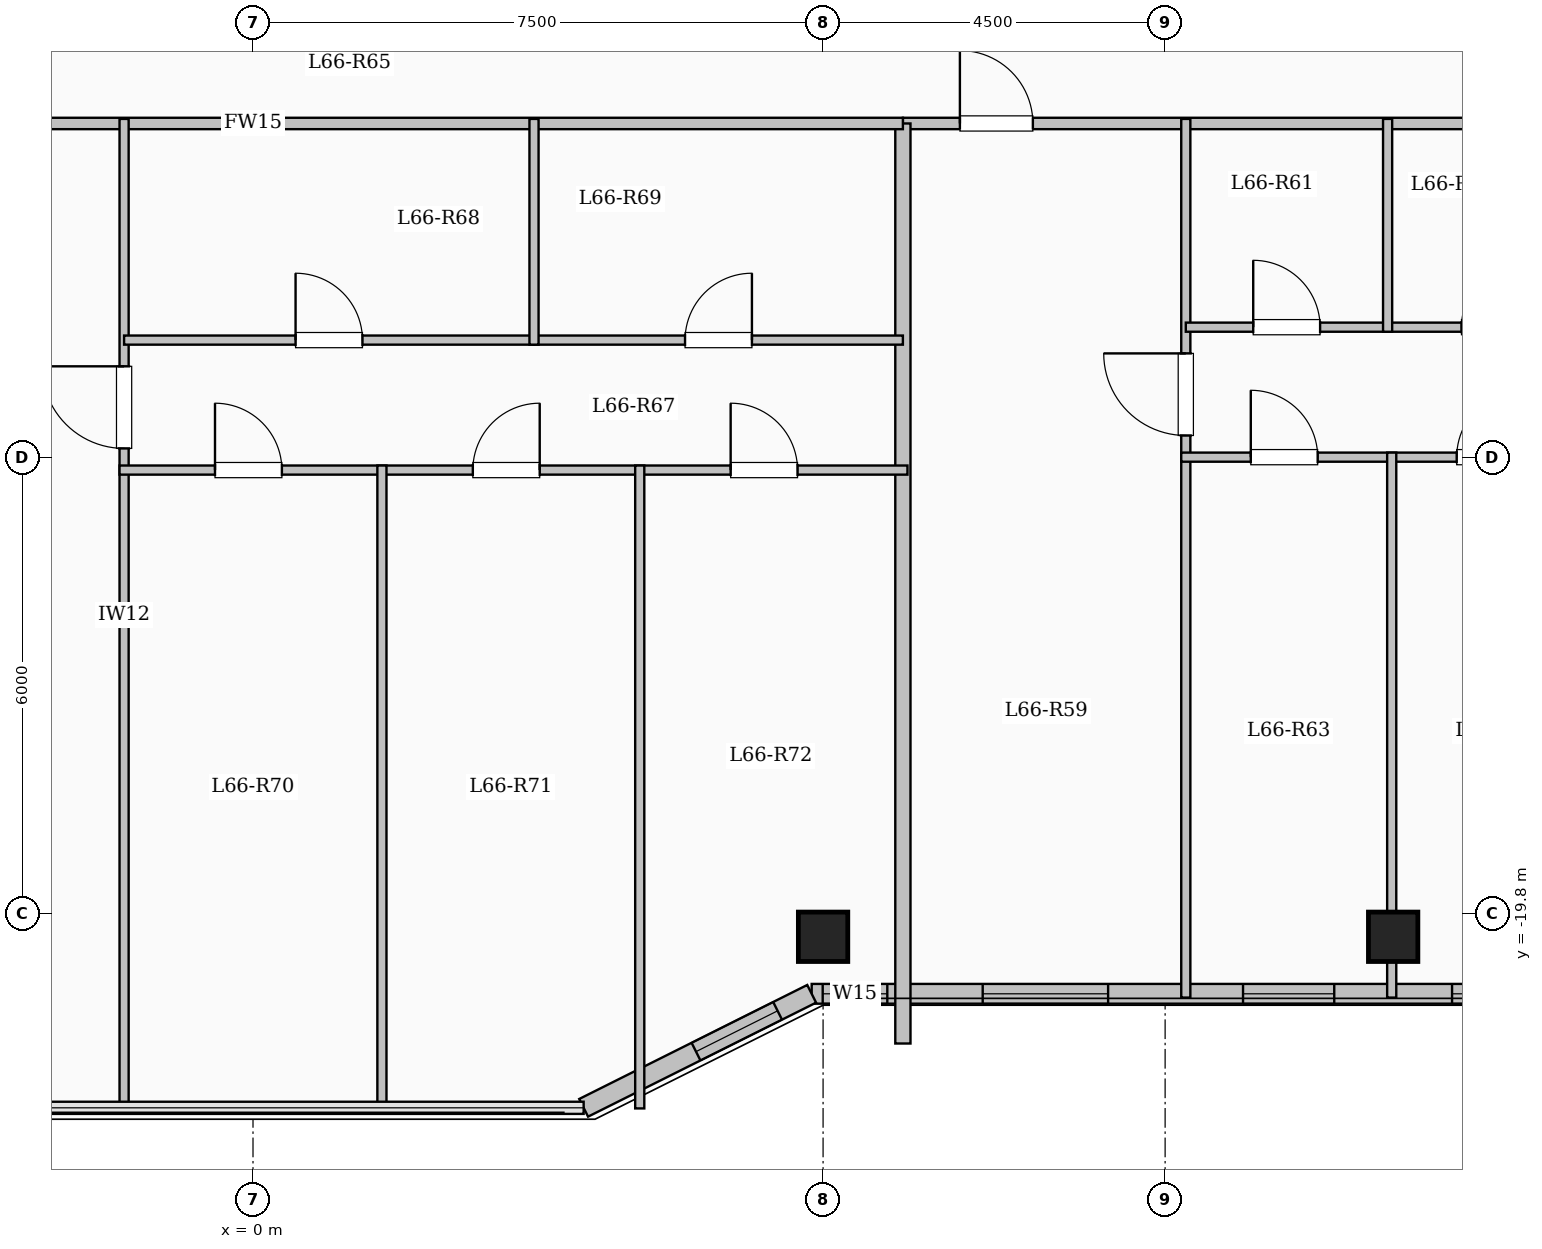
"""IFC4 building model, lengths in metres.
Left out: names, types, materials, properties, quantities, classifications, styles, units other than length and angle.
Written with IfcOpenShell. Run it as: python <this file> out.ifc"""

import sys

from ifc_helpers import new_model, si_unit, direction, frame, frame_2d, origin, origin_2d, place, context, subcontext, project, spatial, rectangle, extrude, element, fill, save


model = new_model("IFC4")
c1 = context("Model", 3, precision=1e-05, world=origin(), true_north=direction((0.0, 1.0)))
c2 = subcontext(c1, "Body", "Model", "MODEL_VIEW")
j1 = project(units=[si_unit("LENGTHUNIT", "METRE"), si_unit("PLANEANGLEUNIT", "RADIAN")], contexts=[c1])
p1 = place(None, origin())
s1 = spatial("IfcSite", under=j1, at=p1, CompositionType="ELEMENT")
p2 = place(p1, origin())
s2 = spatial("IfcBuilding", under=s1, at=p2, CompositionType="ELEMENT")
p3 = place(p2, frame((0.0, 0.0, 244.85)))
s3 = spatial("IfcBuildingStorey", under=s2, at=p3, CompositionType="ELEMENT", Elevation=244.85)
for number, where, z_axis, x_axis in (
    (1, (7.5, -20.1, 0.0), (0.0, 0.0, 1.0), (1.0, 0.0, 0.0)),
    (2, (15.0, -20.1, 0.0), (0.0, 0.0, 1.0), (1.0, 0.0, 0.0)),
):
    element("IfcColumn", number, at=place(p3, frame(where, z_axis=z_axis, x_axis=x_axis)), inside=s3, PredefinedType="COLUMN", context=c2, shape_type="SweptSolid", body=[
        extrude(rectangle(XDim=0.65, YDim=0.65, at=origin_2d()), origin(), (0.0, 0.0, 1.0), 3.35),
    ])
p4 = place(p3, frame((17.85, -20.85, 0.0), z_axis=(0.0, 0.0, 1.0), x_axis=(-1.0, 0.0, 0.0)))
e3 = element("IfcWall", 3, at=p4, inside=s3, PredefinedType="SOLIDWALL", context=c2, shape_type="SweptSolid", body=[
    extrude(rectangle(XDim=10.5, YDim=0.26, at=frame_2d((5.25, 0.0))), origin(), (0.0, 0.0, 1.0), 3.1),
])
p5 = place(p4, frame((0.875, 0.0, 0.95)))
e4 = element("IfcOpeningElement", 4, at=p5, cuts=e3, PredefinedType="OPENING", context=c2, shape_type="SweptSolid", body=[
    extrude(rectangle(XDim=1.2, YDim=1.5, at=frame_2d((0.6, 0.75))), frame((0.0, 0.14, 0.0), z_axis=(0.0, -1.0, 0.0), x_axis=(1.0, 0.0, 0.0)), (0.0, 0.0, 1.0), 0.28),
])
p6 = place(p4, frame((3.625, 0.0, 0.95)))
e5 = element("IfcOpeningElement", 5, at=p6, cuts=e3, PredefinedType="OPENING", context=c2, shape_type="SweptSolid", body=[
    extrude(rectangle(XDim=1.2, YDim=1.5, at=frame_2d((0.6, 0.75))), frame((0.0, 0.14, 0.0), z_axis=(0.0, -1.0, 0.0), x_axis=(1.0, 0.0, 0.0)), (0.0, 0.0, 1.0), 0.28),
])
p7 = place(p4, frame((6.6, 0.0, 0.9)))
e6 = element("IfcOpeningElement", 6, at=p7, cuts=e3, PredefinedType="OPENING", context=c2, shape_type="SweptSolid", body=[
    extrude(rectangle(XDim=1.65, YDim=1.6, at=frame_2d((0.825, 0.8))), frame((0.0, 0.14, 0.0), z_axis=(0.0, -1.0, 0.0), x_axis=(1.0, 0.0, 0.0)), (0.0, 0.0, 1.0), 0.28),
])
p8 = place(p4, frame((9.505, 0.0, 0.95)))
e7 = element("IfcOpeningElement", 7, at=p8, cuts=e3, PredefinedType="OPENING", context=c2, shape_type="SweptSolid", body=[
    extrude(rectangle(XDim=0.85, YDim=1.5, at=frame_2d((0.425, 0.75))), frame((0.0, 0.14, 0.0), z_axis=(0.0, -1.0, 0.0), x_axis=(1.0, 0.0, 0.0)), (0.0, 0.0, 1.0), 0.28),
])
p9 = place(p3, frame((7.35, -20.85, 0.0), z_axis=(0.0, 0.0, 1.0), x_axis=(-0.894427191, -0.4472135955, 0.0)))
e8 = element("IfcWall", 8, at=p9, inside=s3, PredefinedType="SOLIDWALL", context=c2, shape_type="SweptSolid", body=[
    extrude(rectangle(XDim=3.354, YDim=0.26, at=frame_2d((1.677, 0.0))), origin(), (0.0, 0.0, 1.0), 3.1),
])
p10 = place(p9, frame((0.501, 0.0, 0.95)))
e9 = element("IfcOpeningElement", 9, at=p10, cuts=e8, PredefinedType="OPENING", context=c2, shape_type="SweptSolid", body=[
    extrude(rectangle(XDim=1.2, YDim=1.5, at=frame_2d((0.6, 0.75))), frame((0.0, 0.14, 0.0), z_axis=(0.0, -1.0, 0.0), x_axis=(1.0, 0.0, 0.0)), (0.0, 0.0, 1.0), 0.28),
])
p11 = place(p3, frame((8.55, -9.4, 0.0), z_axis=(0.0, 0.0, 1.0), x_axis=(1.0, 0.0, 0.0)))
e10 = element("IfcWall", 10, at=p11, inside=s3, PredefinedType="PARTITIONING", context=c2, shape_type="SweptSolid", body=[
    extrude(rectangle(XDim=9.2, YDim=0.15, at=frame_2d((4.6, 0.0))), origin(), (0.0, 0.0, 1.0), 3.1),
])
p12 = place(p11, frame((0.75, 0.0, 0.0)))
e11 = element("IfcOpeningElement", 11, at=p12, cuts=e10, PredefinedType="OPENING", context=c2, shape_type="SweptSolid", body=[
    extrude(rectangle(XDim=0.96, YDim=2.15, at=frame_2d((0.48, 1.075))), frame((0.0, 0.085, 0.0), z_axis=(0.0, -1.0, 0.0), x_axis=(1.0, 0.0, 0.0)), (0.0, 0.0, 1.0), 0.17),
])
p13 = place(p3, frame((12.272, -20.9, 0.0), z_axis=(0.0, 0.0, 1.0), x_axis=(0.0, 1.0, 0.0)))
e12 = element("IfcWall", 12, at=p13, inside=s3, PredefinedType="PARTITIONING", context=c2, shape_type="SweptSolid", body=[
    extrude(rectangle(XDim=11.56, YDim=0.12, at=frame_2d((5.78, 0.0))), origin(), (0.0, 0.0, 1.0), 3.1),
])
p14 = place(p13, frame((7.395, 0.0, 0.0)))
e13 = element("IfcOpeningElement", 13, at=p14, cuts=e12, PredefinedType="OPENING", context=c2, shape_type="SweptSolid", body=[
    extrude(rectangle(XDim=1.08, YDim=2.15, at=frame_2d((0.54, 1.075))), frame((0.0, 0.07, 0.0), z_axis=(0.0, -1.0, 0.0), x_axis=(1.0, 0.0, 0.0)), (0.0, 0.0, 1.0), 0.14),
])
p15 = place(p3, frame((12.272, -12.08, 0.0), z_axis=(0.0, 0.0, 1.0), x_axis=(1.0, 0.0, 0.0)))
e14 = element("IfcWall", 14, at=p15, inside=s3, PredefinedType="PARTITIONING", context=c2, shape_type="SweptSolid", body=[
    extrude(rectangle(XDim=2.655, YDim=0.12, at=frame_2d((1.328, 0.0))), origin(), (0.0, 0.0, 1.0), 2.785),
])
p16 = place(p15, frame((0.887, 0.0, 0.0)))
e15 = element("IfcOpeningElement", 15, at=p16, cuts=e14, PredefinedType="OPENING", context=c2, shape_type="SweptSolid", body=[
    extrude(rectangle(XDim=0.88, YDim=2.1, at=frame_2d((0.44, 1.05))), frame((0.0, 0.07, 0.0), z_axis=(0.0, -1.0, 0.0), x_axis=(1.0, 0.0, 0.0)), (0.0, 0.0, 1.0), 0.14),
])
p17 = place(p3, frame((14.927, -12.08, 0.0), z_axis=(0.0, 0.0, 1.0), x_axis=(1.0, 0.0, 0.0)))
e16 = element("IfcWall", 16, at=p17, inside=s3, PredefinedType="PARTITIONING", context=c2, shape_type="SweptSolid", body=[
    extrude(rectangle(XDim=2.823, YDim=0.12, at=frame_2d((1.412, 0.0))), origin(), (0.0, 0.0, 1.0), 3.1),
])
p18 = place(p17, frame((0.972, 0.0, 0.0)))
e17 = element("IfcOpeningElement", 17, at=p18, cuts=e16, PredefinedType="OPENING", context=c2, shape_type="SweptSolid", body=[
    extrude(rectangle(XDim=0.88, YDim=2.1, at=frame_2d((0.44, 1.05))), frame((0.0, 0.07, 0.0), z_axis=(0.0, -1.0, 0.0), x_axis=(1.0, 0.0, 0.0)), (0.0, 0.0, 1.0), 0.14),
])
p19 = place(p3, frame((12.212, -13.79, 0.0), z_axis=(0.0, 0.0, 1.0), x_axis=(1.0, 0.0, 0.0)))
e18 = element("IfcWall", 18, at=p19, inside=s3, PredefinedType="PARTITIONING", context=c2, shape_type="SweptSolid", body=[
    extrude(rectangle(XDim=5.598, YDim=0.12, at=frame_2d((2.799, 0.0))), origin(), (0.0, 0.0, 1.0), 2.785),
])
p20 = place(p19, frame((0.915, 0.0, 0.0)))
e19 = element("IfcOpeningElement", 19, at=p20, cuts=e18, PredefinedType="OPENING", context=c2, shape_type="SweptSolid", body=[
    extrude(rectangle(XDim=0.88, YDim=2.1, at=frame_2d((0.44, 1.05))), frame((0.0, 0.07, 0.0), z_axis=(0.0, -1.0, 0.0), x_axis=(1.0, 0.0, 0.0)), (0.0, 0.0, 1.0), 0.14),
])
p21 = place(p19, frame((3.624, 0.0, 0.0)))
e20 = element("IfcOpeningElement", 20, at=p21, cuts=e18, PredefinedType="OPENING", context=c2, shape_type="SweptSolid", body=[
    extrude(rectangle(XDim=0.88, YDim=2.1, at=frame_2d((0.44, 1.05))), frame((0.0, 0.07, 0.0), z_axis=(0.0, -1.0, 0.0), x_axis=(1.0, 0.0, 0.0)), (0.0, 0.0, 1.0), 0.14),
])
p22 = place(p3, frame((14.927, -12.14, 0.0), z_axis=(0.0, 0.0, 1.0), x_axis=(0.0, 1.0, 0.0)))
e21 = element("IfcWall", 21, at=p22, inside=s3, PredefinedType="PARTITIONING", context=c2, shape_type="SweptSolid", body=[
    extrude(rectangle(XDim=2.8, YDim=0.12, at=frame_2d((1.4, 0.0))), origin(), (0.0, 0.0, 1.0), 2.685),
])
p23 = place(p3, frame((14.981, -20.9, 0.0), z_axis=(0.0, 0.0, 1.0), x_axis=(0.0, 1.0, 0.0)))
e22 = element("IfcWall", 22, at=p23, inside=s3, PredefinedType="PARTITIONING", context=c2, shape_type="SweptSolid", body=[
    extrude(rectangle(XDim=7.17, YDim=0.12, at=frame_2d((3.585, 0.0))), origin(), (0.0, 0.0, 1.0), 2.685),
])
p24 = place(p3, frame((8.55, -21.504, 0.0), z_axis=(0.0, 0.0, 1.0), x_axis=(0.0, 1.0, 0.0)))
e23 = element("IfcWall", 23, at=p24, inside=s3, PredefinedType="SOLIDWALL", context=c2, shape_type="SweptSolid", body=[
    extrude(rectangle(XDim=12.104, YDim=0.2, at=frame_2d((6.052, 0.0))), origin(), (0.0, 0.0, 1.0), 3.1),
])
p25 = place(p3, frame((-8.55, -9.4, 0.0), z_axis=(0.0, 0.0, 1.0), x_axis=(1.0, 0.0, 0.0)))
e24 = element("IfcWall", 24, at=p25, inside=s3, PredefinedType="PARTITIONING", context=c2, shape_type="SweptSolid", body=[
    extrude(rectangle(XDim=17.1, YDim=0.15, at=frame_2d((8.55, 0.0))), origin(), (0.0, 0.0, 1.0), 3.1),
])
p26 = place(p25, frame((1.75, 0.0, 0.0)))
e25 = element("IfcOpeningElement", 25, at=p26, cuts=e24, PredefinedType="OPENING", context=c2, shape_type="SweptSolid", body=[
    extrude(rectangle(XDim=0.96, YDim=2.15, at=frame_2d((0.48, 1.075))), frame((0.0, 0.085, 0.0), z_axis=(0.0, -1.0, 0.0), x_axis=(1.0, 0.0, 0.0)), (0.0, 0.0, 1.0), 0.17),
])
p27 = place(p3, frame((-1.696, -22.38, 0.0), z_axis=(0.0, 0.0, 1.0), x_axis=(0.0, 1.0, 0.0)))
e26 = element("IfcWall", 26, at=p27, inside=s3, PredefinedType="PARTITIONING", context=c2, shape_type="SweptSolid", body=[
    extrude(rectangle(XDim=13.04, YDim=0.12, at=frame_2d((6.52, 0.0))), origin(), (0.0, 0.0, 1.0), 3.1),
])
p28 = place(p27, frame((8.705, 0.0, 0.0)))
e27 = element("IfcOpeningElement", 27, at=p28, cuts=e26, PredefinedType="OPENING", context=c2, shape_type="SweptSolid", body=[
    extrude(rectangle(XDim=1.08, YDim=2.15, at=frame_2d((0.54, 1.075))), frame((0.0, 0.07, 0.0), z_axis=(0.0, -1.0, 0.0), x_axis=(1.0, 0.0, 0.0)), (0.0, 0.0, 1.0), 0.14),
])
p29 = place(p3, frame((-1.696, -12.25, 0.0), z_axis=(0.0, 0.0, 1.0), x_axis=(1.0, 0.0, 0.0)))
e28 = element("IfcWall", 28, at=p29, inside=s3, PredefinedType="PARTITIONING", context=c2, shape_type="SweptSolid", body=[
    extrude(rectangle(XDim=5.393, YDim=0.12, at=frame_2d((2.697, 0.0))), origin(), (0.0, 0.0, 1.0), 2.785),
])
p30 = place(p29, frame((2.256, 0.0, 0.0)))
e29 = element("IfcOpeningElement", 29, at=p30, cuts=e28, PredefinedType="OPENING", context=c2, shape_type="SweptSolid", body=[
    extrude(rectangle(XDim=0.88, YDim=2.1, at=frame_2d((0.44, 1.05))), frame((0.0, 0.07, 0.0), z_axis=(0.0, -1.0, 0.0), x_axis=(1.0, 0.0, 0.0)), (0.0, 0.0, 1.0), 0.14),
])
p31 = place(p3, frame((3.697, -12.25, 0.0), z_axis=(0.0, 0.0, 1.0), x_axis=(1.0, 0.0, 0.0)))
e30 = element("IfcWall", 30, at=p31, inside=s3, PredefinedType="PARTITIONING", context=c2, shape_type="SweptSolid", body=[
    extrude(rectangle(XDim=4.853, YDim=0.12, at=frame_2d((2.427, 0.0))), origin(), (0.0, 0.0, 1.0), 2.785),
])
p32 = place(p31, frame((1.987, 0.0, 0.0)))
e31 = element("IfcOpeningElement", 31, at=p32, cuts=e30, PredefinedType="OPENING", context=c2, shape_type="SweptSolid", body=[
    extrude(rectangle(XDim=0.88, YDim=2.1, at=frame_2d((0.44, 1.05))), frame((0.0, 0.07, 0.0), z_axis=(0.0, -1.0, 0.0), x_axis=(1.0, 0.0, 0.0)), (0.0, 0.0, 1.0), 0.14),
])
p33 = place(p3, frame((-1.756, -13.96, 0.0), z_axis=(0.0, 0.0, 1.0), x_axis=(1.0, 0.0, 0.0)))
e32 = element("IfcWall", 32, at=p33, inside=s3, PredefinedType="PARTITIONING", context=c2, shape_type="SweptSolid", body=[
    extrude(rectangle(XDim=10.366, YDim=0.12, at=frame_2d((5.183, 0.0))), origin(), (0.0, 0.0, 1.0), 2.785),
])
p34 = place(p33, frame((1.256, 0.0, 0.0)))
e33 = element("IfcOpeningElement", 33, at=p34, cuts=e32, PredefinedType="OPENING", context=c2, shape_type="SweptSolid", body=[
    extrude(rectangle(XDim=0.88, YDim=2.1, at=frame_2d((0.44, 1.05))), frame((0.0, 0.07, 0.0), z_axis=(0.0, -1.0, 0.0), x_axis=(1.0, 0.0, 0.0)), (0.0, 0.0, 1.0), 0.14),
])
p35 = place(p33, frame((4.648, 0.0, 0.0)))
e34 = element("IfcOpeningElement", 34, at=p35, cuts=e32, PredefinedType="OPENING", context=c2, shape_type="SweptSolid", body=[
    extrude(rectangle(XDim=0.88, YDim=2.1, at=frame_2d((0.44, 1.05))), frame((0.0, 0.07, 0.0), z_axis=(0.0, -1.0, 0.0), x_axis=(1.0, 0.0, 0.0)), (0.0, 0.0, 1.0), 0.14),
])
p36 = place(p33, frame((8.04, 0.0, 0.0)))
e35 = element("IfcOpeningElement", 35, at=p36, cuts=e32, PredefinedType="OPENING", context=c2, shape_type="SweptSolid", body=[
    extrude(rectangle(XDim=0.88, YDim=2.1, at=frame_2d((0.44, 1.05))), frame((0.0, 0.07, 0.0), z_axis=(0.0, -1.0, 0.0), x_axis=(1.0, 0.0, 0.0)), (0.0, 0.0, 1.0), 0.14),
])
p37 = place(p3, frame((3.697, -12.31, 0.0), z_axis=(0.0, 0.0, 1.0), x_axis=(0.0, 1.0, 0.0)))
e36 = element("IfcWall", 36, at=p37, inside=s3, PredefinedType="PARTITIONING", context=c2, shape_type="SweptSolid", body=[
    extrude(rectangle(XDim=2.97, YDim=0.12, at=frame_2d((1.485, 0.0))), origin(), (0.0, 0.0, 1.0), 3.1),
])
p38 = place(p3, frame((1.696, -22.38, 0.0), z_axis=(0.0, 0.0, 1.0), x_axis=(0.0, 1.0, 0.0)))
e37 = element("IfcWall", 37, at=p38, inside=s3, PredefinedType="PARTITIONING", context=c2, shape_type="SweptSolid", body=[
    extrude(rectangle(XDim=8.48, YDim=0.12, at=frame_2d((4.24, 0.0))), origin(), (0.0, 0.0, 1.0), 3.1),
])
p39 = place(p3, frame((5.088, -22.358, 0.0), z_axis=(0.0, 0.0, 1.0), x_axis=(0.0, 1.0, 0.0)))
e38 = element("IfcWall", 38, at=p39, inside=s3, PredefinedType="PARTITIONING", context=c2, shape_type="SweptSolid", body=[
    extrude(rectangle(XDim=8.458, YDim=0.12, at=frame_2d((4.229, 0.0))), origin(), (0.0, 0.0, 1.0), 3.1),
])
p40 = place(p5, origin())
e39 = element("IfcWindow", 39, at=p40, inside=s3, PartitioningType="SINGLE_PANEL", PredefinedType="WINDOW", context=c2, shape_type="SweptSolid", body=[
    extrude(rectangle(XDim=1.2, YDim=1.5, at=frame_2d((0.6, 0.75))), frame((0.0, 0.03, 0.0), z_axis=(0.0, -1.0, 0.0), x_axis=(1.0, 0.0, 0.0)), (0.0, 0.0, 1.0), 0.06),
])
fill(e4, e39)
p41 = place(p6, origin())
e40 = element("IfcWindow", 40, at=p41, inside=s3, PartitioningType="SINGLE_PANEL", PredefinedType="WINDOW", context=c2, shape_type="SweptSolid", body=[
    extrude(rectangle(XDim=1.2, YDim=1.5, at=frame_2d((0.6, 0.75))), frame((0.0, 0.03, 0.0), z_axis=(0.0, -1.0, 0.0), x_axis=(1.0, 0.0, 0.0)), (0.0, 0.0, 1.0), 0.06),
])
fill(e5, e40)
p42 = place(p7, origin())
e41 = element("IfcWindow", 41, at=p42, inside=s3, PartitioningType="SINGLE_PANEL", PredefinedType="WINDOW", context=c2, shape_type="SweptSolid", body=[
    extrude(rectangle(XDim=1.65, YDim=1.6, at=frame_2d((0.825, 0.8))), frame((0.0, 0.03, 0.0), z_axis=(0.0, -1.0, 0.0), x_axis=(1.0, 0.0, 0.0)), (0.0, 0.0, 1.0), 0.06),
])
fill(e6, e41)
p43 = place(p8, origin())
e42 = element("IfcWindow", 42, at=p43, inside=s3, PartitioningType="SINGLE_PANEL", PredefinedType="WINDOW", context=c2, shape_type="SweptSolid", body=[
    extrude(rectangle(XDim=0.85, YDim=1.5, at=frame_2d((0.425, 0.75))), frame((0.0, 0.03, 0.0), z_axis=(0.0, -1.0, 0.0), x_axis=(1.0, 0.0, 0.0)), (0.0, 0.0, 1.0), 0.06),
])
fill(e7, e42)
p44 = place(p10, origin())
e43 = element("IfcWindow", 43, at=p44, inside=s3, PartitioningType="SINGLE_PANEL", PredefinedType="WINDOW", context=c2, shape_type="SweptSolid", body=[
    extrude(rectangle(XDim=1.2, YDim=1.5, at=frame_2d((0.6, 0.75))), frame((0.0, 0.03, 0.0), z_axis=(0.0, -1.0, 0.0), x_axis=(1.0, 0.0, 0.0)), (0.0, 0.0, 1.0), 0.06),
])
fill(e9, e43)
p45 = place(p12, origin())
e44 = element("IfcDoor", 44, at=p45, inside=s3, OperationType="SINGLE_SWING_LEFT", PredefinedType="DOOR", context=c2, shape_type="SweptSolid", body=[
    extrude(rectangle(XDim=0.96, YDim=2.15, at=frame_2d((0.48, 1.075))), frame((0.0, 0.025, 0.0), z_axis=(0.0, -1.0, 0.0), x_axis=(1.0, 0.0, 0.0)), (0.0, 0.0, 1.0), 0.05),
])
fill(e11, e44)
p46 = place(p14, origin())
e45 = element("IfcDoor", 45, at=p46, inside=s3, OperationType="SINGLE_SWING_RIGHT", PredefinedType="DOOR", context=c2, shape_type="SweptSolid", body=[
    extrude(rectangle(XDim=1.08, YDim=2.15, at=frame_2d((0.54, 1.075))), frame((0.0, 0.025, 0.0), z_axis=(0.0, -1.0, 0.0), x_axis=(1.0, 0.0, 0.0)), (0.0, 0.0, 1.0), 0.05),
])
fill(e13, e45)
p47 = place(p16, origin())
e46 = element("IfcDoor", 46, at=p47, inside=s3, OperationType="SINGLE_SWING_LEFT", PredefinedType="DOOR", context=c2, shape_type="SweptSolid", body=[
    extrude(rectangle(XDim=0.88, YDim=2.1, at=frame_2d((0.44, 1.05))), frame((0.0, 0.025, 0.0), z_axis=(0.0, -1.0, 0.0), x_axis=(1.0, 0.0, 0.0)), (0.0, 0.0, 1.0), 0.05),
])
fill(e15, e46)
p48 = place(p18, origin())
e47 = element("IfcDoor", 47, at=p48, inside=s3, OperationType="SINGLE_SWING_RIGHT", PredefinedType="DOOR", context=c2, shape_type="SweptSolid", body=[
    extrude(rectangle(XDim=0.88, YDim=2.1, at=frame_2d((0.44, 1.05))), frame((0.0, 0.025, 0.0), z_axis=(0.0, -1.0, 0.0), x_axis=(1.0, 0.0, 0.0)), (0.0, 0.0, 1.0), 0.05),
])
fill(e17, e47)
p49 = place(p20, origin())
e48 = element("IfcDoor", 48, at=p49, inside=s3, OperationType="SINGLE_SWING_LEFT", PredefinedType="DOOR", context=c2, shape_type="SweptSolid", body=[
    extrude(rectangle(XDim=0.88, YDim=2.1, at=frame_2d((0.44, 1.05))), frame((0.0, 0.025, 0.0), z_axis=(0.0, -1.0, 0.0), x_axis=(1.0, 0.0, 0.0)), (0.0, 0.0, 1.0), 0.05),
])
fill(e19, e48)
p50 = place(p21, origin())
e49 = element("IfcDoor", 49, at=p50, inside=s3, OperationType="SINGLE_SWING_RIGHT", PredefinedType="DOOR", context=c2, shape_type="SweptSolid", body=[
    extrude(rectangle(XDim=0.88, YDim=2.1, at=frame_2d((0.44, 1.05))), frame((0.0, 0.025, 0.0), z_axis=(0.0, -1.0, 0.0), x_axis=(1.0, 0.0, 0.0)), (0.0, 0.0, 1.0), 0.05),
])
fill(e20, e49)
p51 = place(p28, origin())
e50 = element("IfcDoor", 50, at=p51, inside=s3, OperationType="SINGLE_SWING_RIGHT", PredefinedType="DOOR", context=c2, shape_type="SweptSolid", body=[
    extrude(rectangle(XDim=1.08, YDim=2.15, at=frame_2d((0.54, 1.075))), frame((0.0, 0.025, 0.0), z_axis=(0.0, -1.0, 0.0), x_axis=(1.0, 0.0, 0.0)), (0.0, 0.0, 1.0), 0.05),
])
fill(e27, e50)
p52 = place(p30, origin())
e51 = element("IfcDoor", 51, at=p52, inside=s3, OperationType="SINGLE_SWING_LEFT", PredefinedType="DOOR", context=c2, shape_type="SweptSolid", body=[
    extrude(rectangle(XDim=0.88, YDim=2.1, at=frame_2d((0.44, 1.05))), frame((0.0, 0.025, 0.0), z_axis=(0.0, -1.0, 0.0), x_axis=(1.0, 0.0, 0.0)), (0.0, 0.0, 1.0), 0.05),
])
fill(e29, e51)
p53 = place(p32, origin())
e52 = element("IfcDoor", 52, at=p53, inside=s3, OperationType="SINGLE_SWING_RIGHT", PredefinedType="DOOR", context=c2, shape_type="SweptSolid", body=[
    extrude(rectangle(XDim=0.88, YDim=2.1, at=frame_2d((0.44, 1.05))), frame((0.0, 0.025, 0.0), z_axis=(0.0, -1.0, 0.0), x_axis=(1.0, 0.0, 0.0)), (0.0, 0.0, 1.0), 0.05),
])
fill(e31, e52)
p54 = place(p34, origin())
e53 = element("IfcDoor", 53, at=p54, inside=s3, OperationType="SINGLE_SWING_LEFT", PredefinedType="DOOR", context=c2, shape_type="SweptSolid", body=[
    extrude(rectangle(XDim=0.88, YDim=2.1, at=frame_2d((0.44, 1.05))), frame((0.0, 0.025, 0.0), z_axis=(0.0, -1.0, 0.0), x_axis=(1.0, 0.0, 0.0)), (0.0, 0.0, 1.0), 0.05),
])
fill(e33, e53)
p55 = place(p35, origin())
e54 = element("IfcDoor", 54, at=p55, inside=s3, OperationType="SINGLE_SWING_RIGHT", PredefinedType="DOOR", context=c2, shape_type="SweptSolid", body=[
    extrude(rectangle(XDim=0.88, YDim=2.1, at=frame_2d((0.44, 1.05))), frame((0.0, 0.025, 0.0), z_axis=(0.0, -1.0, 0.0), x_axis=(1.0, 0.0, 0.0)), (0.0, 0.0, 1.0), 0.05),
])
fill(e34, e54)
p56 = place(p36, origin())
e55 = element("IfcDoor", 55, at=p56, inside=s3, OperationType="SINGLE_SWING_LEFT", PredefinedType="DOOR", context=c2, shape_type="SweptSolid", body=[
    extrude(rectangle(XDim=0.88, YDim=2.1, at=frame_2d((0.44, 1.05))), frame((0.0, 0.025, 0.0), z_axis=(0.0, -1.0, 0.0), x_axis=(1.0, 0.0, 0.0)), (0.0, 0.0, 1.0), 0.05),
])
fill(e35, e55)
save(model, sys.argv[1])
